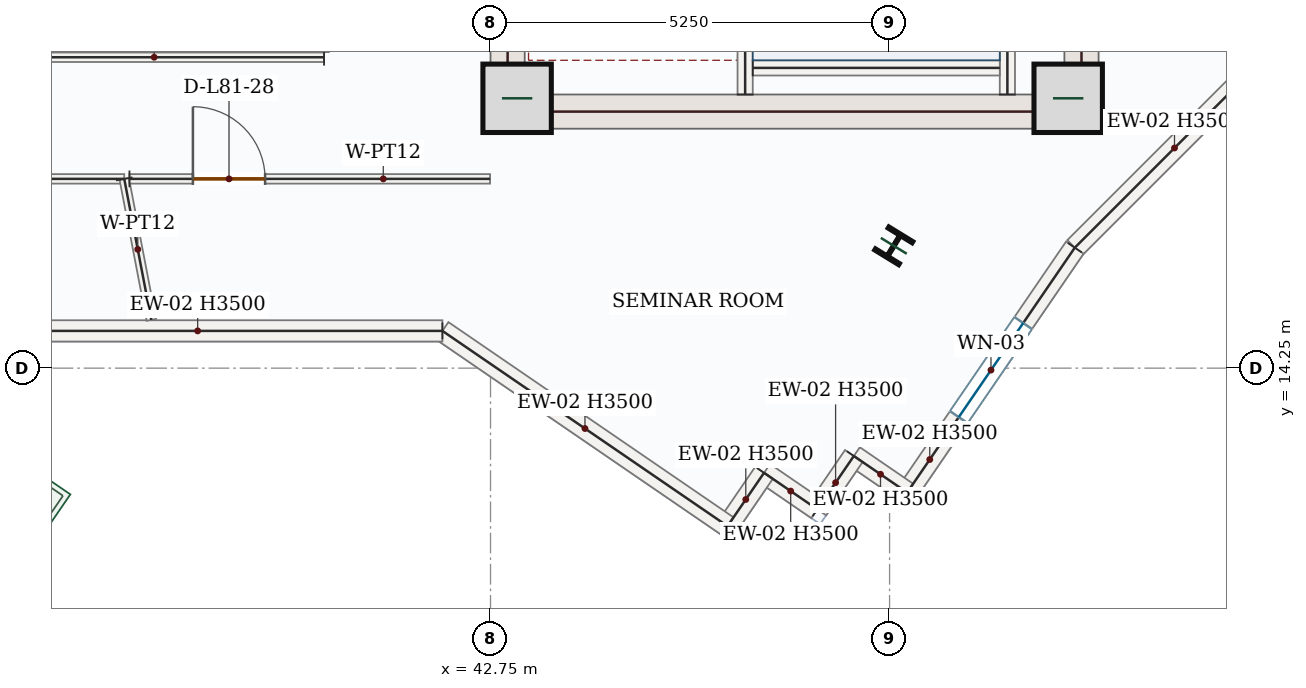
"""IFC4 building model, lengths in metres.
Left out: names, types, materials, properties, quantities, classifications, styles, units other than length and angle.
Written with IfcOpenShell. Run it as: python <this file> out.ifc"""

import sys

from ifc_helpers import new_model, si_unit, direction, frame, frame_2d, origin, origin_2d, place, context, subcontext, project, spatial, rectangle, i_section, extrude, source, transform, mapped, element, fill, save


model = new_model("IFC4")
c1 = context("Model", 3, precision=1e-05, world=origin(), true_north=direction((0.0, 1.0)))
c2 = subcontext(c1, "Body", "Model", "MODEL_VIEW")
j1 = project(units=[si_unit("LENGTHUNIT", "METRE"), si_unit("PLANEANGLEUNIT", "RADIAN")], contexts=[c1])
p1 = place(None, origin())
s1 = spatial("IfcSite", under=j1, at=p1, CompositionType="ELEMENT")
p2 = place(p1, origin())
s2 = spatial("IfcBuilding", under=s1, at=p2, CompositionType="ELEMENT")
p3 = place(p2, frame((0.0, 0.0, 334.8)))
s3 = spatial("IfcBuildingStorey", under=s2, at=p3, CompositionType="ELEMENT", Elevation=334.8)
p4 = place(p3, frame((42.975, 17.4, 0.0), z_axis=(0.0, 0.0, 1.0), x_axis=(0.0, 1.0, 0.0)))
e1 = element("IfcWall", 1, at=p4, inside=s3, PredefinedType="SHEAR", context=c2, shape_type="SweptSolid", body=[
    extrude(rectangle(XDim=8.55, YDim=0.45, at=frame_2d((4.275, 0.0))), origin(), (0.0, 0.0, 1.0), 3.5),
])
p5 = place(p4, frame((6.65, 0.0, 0.0)))
e2 = element("IfcOpeningElement", 2, at=p5, cuts=e1, PredefinedType="OPENING", context=c2, shape_type="SweptSolid", body=[
    extrude(rectangle(XDim=1.1, YDim=2.2, at=frame_2d((0.55, 1.1))), frame((0.0, 0.235, 0.0), z_axis=(0.0, -1.0, 0.0), x_axis=(1.0, 0.0, 0.0)), (0.0, 0.0, 1.0), 0.47),
])
p6 = place(p4, frame((1.75, 0.0, 0.0)))
e3 = element("IfcOpeningElement", 3, at=p6, cuts=e1, PredefinedType="OPENING", context=c2, shape_type="SweptSolid", body=[
    extrude(rectangle(XDim=1.3, YDim=2.2, at=frame_2d((0.65, 1.1))), frame((0.0, 0.235, 0.0), z_axis=(0.0, -1.0, 0.0), x_axis=(1.0, 0.0, 0.0)), (0.0, 0.0, 1.0), 0.47),
])
p7 = place(p4, frame((4.55, 0.0, 0.0)))
e4 = element("IfcOpeningElement", 4, at=p7, cuts=e1, PredefinedType="OPENING", context=c2, shape_type="SweptSolid", body=[
    extrude(rectangle(XDim=0.88, YDim=2.1, at=frame_2d((0.44, 1.05))), frame((0.0, 0.235, 0.0), z_axis=(0.0, -1.0, 0.0), x_axis=(1.0, 0.0, 0.0)), (0.0, 0.0, 1.0), 0.47),
])
m1 = source(origin(), c2, "Body", "SweptSolid", [
    extrude(rectangle(XDim=8.55, YDim=0.45, at=frame_2d((4.275, 0.0))), origin(), (0.0, 0.0, 1.0), 3.5),
])
p8 = place(p3, frame((50.525, 17.4, 0.0), z_axis=(0.0, 0.0, 1.0), x_axis=(0.0, 1.0, 0.0)))
e5 = element("IfcWall", 5, at=p8, inside=s3, PredefinedType="SHEAR", context=c2, shape_type="MappedRepresentation", body=[
    mapped(m1, transform((0.0, 0.0, 0.0), x_axis=(1.0, 0.0, 0.0), y_axis=(0.0, 1.0, 0.0), z_axis=(0.0, 0.0, 1.0), scale=1.0)),
])
m2 = source(origin(), c2, "Body", "SweptSolid", [
    extrude(rectangle(XDim=7.1, YDim=0.45, at=frame_2d((3.55, 0.0))), origin(), (0.0, 0.0, 1.0), 3.5),
])
p9 = place(p3, frame((43.2, 17.625, 0.0), z_axis=(0.0, 0.0, 1.0), x_axis=(1.0, 0.0, 0.0)))
e6 = element("IfcWall", 6, at=p9, inside=s3, PredefinedType="SHEAR", context=c2, shape_type="MappedRepresentation", body=[
    mapped(m2, transform((0.0, 0.0, 0.0), x_axis=(1.0, 0.0, 0.0), y_axis=(0.0, 1.0, 0.0), z_axis=(0.0, 0.0, 1.0), scale=1.0)),
])
m3 = source(origin(), c2, "Body", "SweptSolid", [
    extrude(rectangle(XDim=0.9, YDim=0.9, at=origin_2d()), origin(), (0.0, 0.0, 1.0), 3.75),
])
for number, where, z_axis, x_axis in (
    (7, (43.1, 17.8, 0.0), (0.0, 0.0, 1.0), (1.0, 0.0, 0.0)),
    (8, (50.35, 17.8, 0.0), (0.0, 0.0, 1.0), (1.0, 0.0, 0.0)),
):
    element("IfcColumn", number, at=place(p3, frame(where, z_axis=z_axis, x_axis=x_axis)), inside=s3, PredefinedType="COLUMN", context=c2, shape_type="MappedRepresentation", body=[
        mapped(m3, transform((0.0, 0.0, 0.0), x_axis=(1.0, 0.0, 0.0), y_axis=(0.0, 1.0, 0.0), z_axis=(0.0, 0.0, 1.0), scale=1.0)),
    ])
m4 = source(origin(), c2, "Body", "SweptSolid", [
    extrude(i_section(OverallWidth=0.369, OverallDepth=0.356, WebThickness=0.011, FlangeThickness=0.018, FilletRadius=0.018, at=origin_2d()), origin(), (0.0, 0.0, 1.0), 3.75),
])
p10 = place(p3, frame((48.055, 15.859, 0.0), z_axis=(0.0, 0.0, 1.0), x_axis=(-0.852640164354, 0.522498564716, 0.0)))
e9 = element("IfcColumn", 9, at=p10, inside=s3, PredefinedType="COLUMN", context=c2, shape_type="MappedRepresentation", body=[
    mapped(m4, transform((0.0, 0.0, 0.0), x_axis=(1.0, 0.0, 0.0), y_axis=(0.0, 1.0, 0.0), z_axis=(0.0, 0.0, 1.0), scale=1.0)),
])
m5 = source(origin(), c2, "Body", "SweptSolid", [
    extrude(rectangle(XDim=3.709, YDim=0.28, at=frame_2d((1.855, 0.0))), origin(), (0.0, 0.0, 1.0), 3.5),
])
p11 = place(p3, frame((53.06, 18.458, 0.0), z_axis=(0.0, 0.0, 1.0), x_axis=(-0.707106781187, -0.707106781187, 0.0)))
e10 = element("IfcWall", 10, at=p11, inside=s3, PredefinedType="SOLIDWALL", context=c2, shape_type="MappedRepresentation", body=[
    mapped(m5, transform((0.0, 0.0, 0.0), x_axis=(1.0, 0.0, 0.0), y_axis=(0.0, 1.0, 0.0), z_axis=(0.0, 0.0, 1.0), scale=1.0)),
])
p12 = place(p3, frame((50.437, 15.835, 0.0), z_axis=(0.0, 0.0, 1.0), x_axis=(-0.564961879511, -0.825117006672, 0.0)))
e11 = element("IfcWall", 11, at=p12, inside=s3, PredefinedType="SOLIDWALL", context=c2, shape_type="SweptSolid", body=[
    extrude(rectangle(XDim=3.904, YDim=0.28, at=frame_2d((1.952, 0.0))), origin(), (0.0, 0.0, 1.0), 3.5),
])
p13 = place(p12, frame((1.202, 0.0, 0.85)))
e12 = element("IfcOpeningElement", 12, at=p13, cuts=e11, PredefinedType="OPENING", context=c2, shape_type="SweptSolid", body=[
    extrude(rectangle(XDim=1.5, YDim=1.5, at=frame_2d((0.75, 0.75))), frame((0.0, 0.15, 0.0), z_axis=(0.0, -1.0, 0.0), x_axis=(1.0, 0.0, 0.0)), (0.0, 0.0, 1.0), 0.3),
])
m6 = source(origin(), c2, "Body", "SweptSolid", [
    extrude(rectangle(XDim=0.85, YDim=0.28, at=frame_2d((0.425, 0.0))), origin(), (0.0, 0.0, 1.0), 3.5),
])
for number, where, z_axis, x_axis in (
    (13, (48.231, 12.614, 0.0), (0.0, 0.0, 1.0), (-0.825, 0.565, 0.0)),
    (14, (47.53, 13.094, 0.0), (0.0, 0.0, 1.0), (-0.565, -0.825, 0.0)),
    (15, (47.05, 12.393, 0.0), (0.0, 0.0, 1.0), (-0.825, 0.565, 0.0)),
    (16, (46.348, 12.873, 0.0), (0.0, 0.0, 1.0), (-0.565, -0.825, 0.0)),
):
    element("IfcWall", number, at=place(p3, frame(where, z_axis=z_axis, x_axis=x_axis)), inside=s3, PredefinedType="SOLIDWALL", context=c2, shape_type="MappedRepresentation", body=[
        mapped(m6, transform((0.0, 0.0, 0.0), x_axis=(1.0, 0.0, 0.0), y_axis=(0.0, 1.0, 0.0), z_axis=(0.0, 0.0, 1.0), scale=1.0)),
    ])
m7 = source(origin(), c2, "Body", "SweptSolid", [
    extrude(rectangle(XDim=4.546, YDim=0.28, at=frame_2d((2.273, 0.0))), origin(), (0.0, 0.0, 1.0), 3.5),
])
p14 = place(p3, frame((45.868, 12.171, 0.0), z_axis=(0.0, 0.0, 1.0), x_axis=(-0.825104362901, 0.564980345075, 0.0)))
e17 = element("IfcWall", 17, at=p14, inside=s3, PredefinedType="SOLIDWALL", context=c2, shape_type="MappedRepresentation", body=[
    mapped(m7, transform((0.0, 0.0, 0.0), x_axis=(1.0, 0.0, 0.0), y_axis=(0.0, 1.0, 0.0), z_axis=(0.0, 0.0, 1.0), scale=1.0)),
])
m8 = source(origin(), c2, "Body", "SweptSolid", [
    extrude(rectangle(XDim=6.44, YDim=0.28, at=frame_2d((3.22, 0.0))), origin(), (0.0, 0.0, 1.0), 3.5),
])
p15 = place(p3, frame((42.117, 14.74, 0.0), z_axis=(0.0, 0.0, 1.0), x_axis=(-1.0, 0.0, 0.0)))
e18 = element("IfcWall", 18, at=p15, inside=s3, PredefinedType="SOLIDWALL", context=c2, shape_type="MappedRepresentation", body=[
    mapped(m8, transform((0.0, 0.0, 0.0), x_axis=(1.0, 0.0, 0.0), y_axis=(0.0, 1.0, 0.0), z_axis=(0.0, 0.0, 1.0), scale=1.0)),
])
m9 = source(origin(), c2, "Body", "SweptSolid", [
    extrude(rectangle(XDim=7.87, YDim=0.2, at=frame_2d((3.935, 0.0))), origin(), (0.0, 0.0, 1.0), 3.5),
])
p16 = place(p3, frame((49.55, 17.85, 0.0), z_axis=(0.0, 0.0, 1.0), x_axis=(0.0, 1.0, 0.0)))
e19 = element("IfcWall", 19, at=p16, inside=s3, PredefinedType="SOLIDWALL", context=c2, shape_type="MappedRepresentation", body=[
    mapped(m9, transform((0.0, 0.0, 0.0), x_axis=(1.0, 0.0, 0.0), y_axis=(0.0, 1.0, 0.0), z_axis=(0.0, 0.0, 1.0), scale=1.0)),
])
p17 = place(p3, frame((46.1, 17.85, 0.0), z_axis=(0.0, 0.0, 1.0), x_axis=(0.0, 1.0, 0.0)))
e20 = element("IfcWall", 20, at=p17, inside=s3, PredefinedType="SOLIDWALL", context=c2, shape_type="SweptSolid", body=[
    extrude(rectangle(XDim=8.0, YDim=0.2, at=frame_2d((4.0, 0.0))), origin(), (0.0, 0.0, 1.0), 3.5),
])
p18 = place(p17, frame((6.3, 0.0, 0.0)))
e21 = element("IfcOpeningElement", 21, at=p18, cuts=e20, PredefinedType="OPENING", context=c2, shape_type="SweptSolid", body=[
    extrude(rectangle(XDim=1.05, YDim=2.15, at=frame_2d((0.525, 1.075))), frame((0.0, 0.11, 0.0), z_axis=(0.0, -1.0, 0.0), x_axis=(1.0, 0.0, 0.0)), (0.0, 0.0, 1.0), 0.22),
])
m10 = source(origin(), c2, "Body", "SweptSolid", [
    extrude(rectangle(XDim=3.25, YDim=0.2, at=frame_2d((1.625, 0.0))), origin(), (0.0, 0.0, 1.0), 3.5),
])
p19 = place(p3, frame((46.2, 18.2, 0.0), z_axis=(0.0, 0.0, 1.0), x_axis=(1.0, 0.0, 0.0)))
e22 = element("IfcWall", 22, at=p19, inside=s3, PredefinedType="SOLIDWALL", context=c2, shape_type="MappedRepresentation", body=[
    mapped(m10, transform((0.0, 0.0, 0.0), x_axis=(1.0, 0.0, 0.0), y_axis=(0.0, 1.0, 0.0), z_axis=(0.0, 0.0, 1.0), scale=1.0)),
])
m11 = source(origin(), c2, "Body", "SweptSolid", [
    extrude(rectangle(XDim=4.47, YDim=0.125, at=frame_2d((2.235, 0.0))), origin(), (0.0, 0.0, 1.0), 3.5),
])
p20 = place(p3, frame((40.56, 18.34, 0.0), z_axis=(0.0, 0.0, 1.0), x_axis=(-1.0, 0.0, 0.0)))
e23 = element("IfcWall", 23, at=p20, inside=s3, PredefinedType="PARTITIONING", context=c2, shape_type="MappedRepresentation", body=[
    mapped(m11, transform((0.0, 0.0, 0.0), x_axis=(1.0, 0.0, 0.0), y_axis=(0.0, 1.0, 0.0), z_axis=(0.0, 0.0, 1.0), scale=1.0)),
])
p21 = place(p3, frame((32.235, 16.74, 0.0), z_axis=(0.0, 0.0, 1.0), x_axis=(1.0, 0.0, 0.0)))
e24 = element("IfcWall", 24, at=p21, inside=s3, PredefinedType="PARTITIONING", context=c2, shape_type="SweptSolid", body=[
    extrude(rectangle(XDim=5.696, YDim=0.125, at=frame_2d((2.848, 0.0))), origin(), (0.0, 0.0, 1.0), 3.5),
])
p22 = place(p21, frame((3.085, 0.0, 0.0)))
e25 = element("IfcOpeningElement", 25, at=p22, cuts=e24, PredefinedType="OPENING", context=c2, shape_type="SweptSolid", body=[
    extrude(rectangle(XDim=0.95, YDim=2.15, at=frame_2d((0.475, 1.075))), frame((0.0, 0.073, 0.0), z_axis=(0.0, -1.0, 0.0), x_axis=(1.0, 0.0, 0.0)), (0.0, 0.0, 1.0), 0.145),
])
m12 = source(origin(), c2, "Body", "SweptSolid", [
    extrude(rectangle(XDim=1.889, YDim=0.125, at=frame_2d((0.944, 0.0))), origin(), (0.0, 0.0, 1.0), 3.5),
])
p23 = place(p3, frame((37.931, 16.74, 0.0), z_axis=(0.0, 0.0, 1.0), x_axis=(0.188454265316, -0.982081966989, 0.0)))
e26 = element("IfcWall", 26, at=p23, inside=s3, PredefinedType="PARTITIONING", context=c2, shape_type="MappedRepresentation", body=[
    mapped(m12, transform((0.0, 0.0, 0.0), x_axis=(1.0, 0.0, 0.0), y_axis=(0.0, 1.0, 0.0), z_axis=(0.0, 0.0, 1.0), scale=1.0)),
])
p24 = place(p3, frame((38.0, 16.74, 0.0), z_axis=(0.0, 0.0, 1.0), x_axis=(1.0, 0.0, 0.0)))
e27 = element("IfcWall", 27, at=p24, inside=s3, PredefinedType="PARTITIONING", context=c2, shape_type="SweptSolid", body=[
    extrude(rectangle(XDim=4.744, YDim=0.125, at=frame_2d((2.372, 0.0))), origin(), (0.0, 0.0, 1.0), 3.5),
])
p25 = place(p24, frame((0.835, 0.0, 0.0)))
e28 = element("IfcOpeningElement", 28, at=p25, cuts=e27, PredefinedType="OPENING", context=c2, shape_type="SweptSolid", body=[
    extrude(rectangle(XDim=0.95, YDim=2.15, at=frame_2d((0.475, 1.075))), frame((0.0, 0.073, 0.0), z_axis=(0.0, -1.0, 0.0), x_axis=(1.0, 0.0, 0.0)), (0.0, 0.0, 1.0), 0.145),
])
m13 = source(origin(), c2, "Body", "SweptSolid", [
    extrude(rectangle(XDim=1.5, YDim=1.5, at=frame_2d((0.75, 0.75))), frame((0.0, 0.03, 0.0), z_axis=(0.0, -1.0, 0.0), x_axis=(1.0, 0.0, 0.0)), (0.0, 0.0, 1.0), 0.06),
])
p26 = place(p13, origin())
e29 = element("IfcWindow", 29, at=p26, inside=s3, PartitioningType="SINGLE_PANEL", PredefinedType="WINDOW", context=c2, shape_type="MappedRepresentation", body=[
    mapped(m13, transform((0.0, 0.0, 0.0), x_axis=(1.0, 0.0, 0.0), y_axis=(0.0, 1.0, 0.0), z_axis=(0.0, 0.0, 1.0), scale=1.0)),
])
fill(e12, e29)
m14 = source(origin(), c2, "Body", "SweptSolid", [
    extrude(rectangle(XDim=0.95, YDim=2.15, at=frame_2d((0.475, 1.075))), frame((0.0, 0.025, 0.0), z_axis=(0.0, -1.0, 0.0), x_axis=(1.0, 0.0, 0.0)), (0.0, 0.0, 1.0), 0.05),
])
p27 = place(p25, origin())
e30 = element("IfcDoor", 30, at=p27, inside=s3, OperationType="SINGLE_SWING_LEFT", PredefinedType="DOOR", context=c2, shape_type="MappedRepresentation", body=[
    mapped(m14, transform((0.0, 0.0, 0.0), x_axis=(1.0, 0.0, 0.0), y_axis=(0.0, 1.0, 0.0), z_axis=(0.0, 0.0, 1.0), scale=1.0)),
])
fill(e28, e30)
save(model, sys.argv[1])
